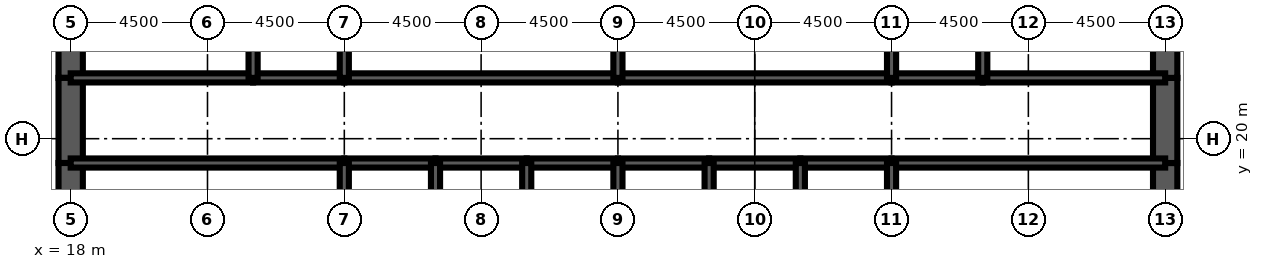
"""IFC4 building model, lengths in metres.
Left out: names, types, materials, properties, quantities, classifications, styles, units other than length and angle.
Written with IfcOpenShell. Run it as: python <this file> out.ifc"""

import sys

from ifc_helpers import new_model, si_unit, direction, frame, frame_2d, origin, place, context, subcontext, project, spatial, rectangle, extrude, element, fill, save


model = new_model("IFC4")
c1 = context("Model", 3, precision=1e-05, world=origin(), true_north=direction((0.0, 1.0)))
c2 = subcontext(c1, "Body", "Model", "MODEL_VIEW")
j1 = project(units=[si_unit("LENGTHUNIT", "METRE"), si_unit("PLANEANGLEUNIT", "RADIAN")], contexts=[c1])
p1 = place(None, origin())
s1 = spatial("IfcSite", under=j1, at=p1, CompositionType="ELEMENT")
p2 = place(p1, origin())
s2 = spatial("IfcBuilding", under=s1, at=p2, CompositionType="ELEMENT")
p3 = place(p2, frame((0.0, 0.0, 223.6)))
s3 = spatial("IfcBuildingStorey", under=s2, at=p3, CompositionType="ELEMENT", Elevation=223.6)
p4 = place(p3, frame((18.0, 26.0, 0.0), z_axis=(0.0, 0.0, 1.0), x_axis=(0.0, -1.0, 0.0)))
e1 = element("IfcWall", 1, at=p4, inside=s3, PredefinedType="SHEAR", context=c2, shape_type="SweptSolid", body=[
    extrude(rectangle(XDim=4.0, YDim=0.8, at=frame_2d((2.0, 0.0))), origin(), (0.0, 0.0, 1.0), 4.2),
])
p5 = place(p3, frame((18.0, 22.0, 0.0), z_axis=(0.0, 0.0, 1.0), x_axis=(0.0, -1.0, 0.0)))
e2 = element("IfcWall", 2, at=p5, inside=s3, PredefinedType="SHEAR", context=c2, shape_type="SweptSolid", body=[
    extrude(rectangle(XDim=2.8, YDim=0.8, at=frame_2d((1.4, 0.0))), origin(), (0.0, 0.0, 1.0), 4.2),
])
p6 = place(p5, frame((0.6, 0.0, 0.0)))
e3 = element("IfcOpeningElement", 3, at=p6, cuts=e2, PredefinedType="OPENING", context=c2, shape_type="SweptSolid", body=[
    extrude(rectangle(XDim=1.8, YDim=2.1, at=frame_2d((0.9, 1.05))), frame((0.0, 0.41, 0.0), z_axis=(0.0, -1.0, 0.0), x_axis=(1.0, 0.0, 0.0)), (0.0, 0.0, 1.0), 0.82),
])
for number, where, z_axis, x_axis in (
    (4, (18.0, 19.2, 0.0), (0.0, 0.0, 1.0), (0.0, -1.0, 0.0)),
    (5, (54.0, 16.0, 0.0), (0.0, 0.0, 1.0), (0.0, 1.0, 0.0)),
):
    element("IfcWall", number, at=place(p3, frame(where, z_axis=z_axis, x_axis=x_axis)), inside=s3, PredefinedType="SHEAR", context=c2, shape_type="SweptSolid", body=[
        extrude(rectangle(XDim=3.2, YDim=0.8, at=frame_2d((1.6, 0.0))), origin(), (0.0, 0.0, 1.0), 4.2),
    ])
p7 = place(p3, frame((54.0, 19.2, 0.0), z_axis=(0.0, 0.0, 1.0), x_axis=(0.0, 1.0, 0.0)))
e6 = element("IfcWall", 6, at=p7, inside=s3, PredefinedType="SHEAR", context=c2, shape_type="SweptSolid", body=[
    extrude(rectangle(XDim=2.8, YDim=0.8, at=frame_2d((1.4, 0.0))), origin(), (0.0, 0.0, 1.0), 4.2),
])
p8 = place(p7, frame((0.4, 0.0, 0.0)))
e7 = element("IfcOpeningElement", 7, at=p8, cuts=e6, PredefinedType="OPENING", context=c2, shape_type="SweptSolid", body=[
    extrude(rectangle(XDim=1.8, YDim=2.1, at=frame_2d((0.9, 1.05))), frame((0.0, 0.41, 0.0), z_axis=(0.0, -1.0, 0.0), x_axis=(1.0, 0.0, 0.0)), (0.0, 0.0, 1.0), 0.82),
])
p9 = place(p3, frame((54.0, 22.0, 0.0), z_axis=(0.0, 0.0, 1.0), x_axis=(0.0, 1.0, 0.0)))
e8 = element("IfcWall", 8, at=p9, inside=s3, PredefinedType="SHEAR", context=c2, shape_type="SweptSolid", body=[
    extrude(rectangle(XDim=4.0, YDim=0.8, at=frame_2d((2.0, 0.0))), origin(), (0.0, 0.0, 1.0), 4.2),
])
p10 = place(p3, frame((18.0, 19.2, 0.0), z_axis=(0.0, 0.0, 1.0), x_axis=(1.0, 0.0, 0.0)))
e9 = element("IfcWall", 9, at=p10, inside=s3, PredefinedType="SOLIDWALL", context=c2, shape_type="SweptSolid", body=[
    extrude(rectangle(XDim=9.0, YDim=0.3, at=frame_2d((4.5, 0.0))), origin(), (0.0, 0.0, 1.0), 4.2),
])
p11 = place(p10, frame((0.65, 0.0, 0.0)))
e10 = element("IfcOpeningElement", 10, at=p11, cuts=e9, PredefinedType="OPENING", context=c2, shape_type="SweptSolid", body=[
    extrude(rectangle(XDim=1.0, YDim=2.1, at=frame_2d((0.5, 1.05))), frame((0.0, 0.16, 0.0), z_axis=(0.0, -1.0, 0.0), x_axis=(1.0, 0.0, 0.0)), (0.0, 0.0, 1.0), 0.32),
])
p12 = place(p3, frame((27.0, 19.2, 0.0), z_axis=(0.0, 0.0, 1.0), x_axis=(1.0, 0.0, 0.0)))
e11 = element("IfcWall", 11, at=p12, inside=s3, PredefinedType="SOLIDWALL", context=c2, shape_type="SweptSolid", body=[
    extrude(rectangle(XDim=3.0, YDim=0.3, at=frame_2d((1.5, 0.0))), origin(), (0.0, 0.0, 1.0), 4.2),
])
p13 = place(p12, frame((0.95, 0.0, 0.0)))
e12 = element("IfcOpeningElement", 12, at=p13, cuts=e11, PredefinedType="OPENING", context=c2, shape_type="SweptSolid", body=[
    extrude(rectangle(XDim=1.1, YDim=2.2, at=frame_2d((0.55, 1.1))), frame((0.0, 0.16, 0.0), z_axis=(0.0, -1.0, 0.0), x_axis=(1.0, 0.0, 0.0)), (0.0, 0.0, 1.0), 0.32),
])
p14 = place(p3, frame((30.0, 19.2, 0.0), z_axis=(0.0, 0.0, 1.0), x_axis=(1.0, 0.0, 0.0)))
e13 = element("IfcWall", 13, at=p14, inside=s3, PredefinedType="SOLIDWALL", context=c2, shape_type="SweptSolid", body=[
    extrude(rectangle(XDim=3.0, YDim=0.3, at=frame_2d((1.5, 0.0))), origin(), (0.0, 0.0, 1.0), 4.2),
])
p15 = place(p14, frame((0.95, 0.0, 0.0)))
e14 = element("IfcOpeningElement", 14, at=p15, cuts=e13, PredefinedType="OPENING", context=c2, shape_type="SweptSolid", body=[
    extrude(rectangle(XDim=1.1, YDim=2.2, at=frame_2d((0.55, 1.1))), frame((0.0, 0.16, 0.0), z_axis=(0.0, -1.0, 0.0), x_axis=(1.0, 0.0, 0.0)), (0.0, 0.0, 1.0), 0.32),
])
p16 = place(p3, frame((33.0, 19.2, 0.0), z_axis=(0.0, 0.0, 1.0), x_axis=(1.0, 0.0, 0.0)))
e15 = element("IfcWall", 15, at=p16, inside=s3, PredefinedType="SOLIDWALL", context=c2, shape_type="SweptSolid", body=[
    extrude(rectangle(XDim=3.0, YDim=0.3, at=frame_2d((1.5, 0.0))), origin(), (0.0, 0.0, 1.0), 4.2),
])
p17 = place(p16, frame((0.95, 0.0, 0.0)))
e16 = element("IfcOpeningElement", 16, at=p17, cuts=e15, PredefinedType="OPENING", context=c2, shape_type="SweptSolid", body=[
    extrude(rectangle(XDim=1.1, YDim=2.2, at=frame_2d((0.55, 1.1))), frame((0.0, 0.16, 0.0), z_axis=(0.0, -1.0, 0.0), x_axis=(1.0, 0.0, 0.0)), (0.0, 0.0, 1.0), 0.32),
])
p18 = place(p3, frame((36.0, 19.2, 0.0), z_axis=(0.0, 0.0, 1.0), x_axis=(1.0, 0.0, 0.0)))
e17 = element("IfcWall", 17, at=p18, inside=s3, PredefinedType="SOLIDWALL", context=c2, shape_type="SweptSolid", body=[
    extrude(rectangle(XDim=3.0, YDim=0.3, at=frame_2d((1.5, 0.0))), origin(), (0.0, 0.0, 1.0), 4.2),
])
p19 = place(p18, frame((0.95, 0.0, 0.0)))
e18 = element("IfcOpeningElement", 18, at=p19, cuts=e17, PredefinedType="OPENING", context=c2, shape_type="SweptSolid", body=[
    extrude(rectangle(XDim=1.1, YDim=2.2, at=frame_2d((0.55, 1.1))), frame((0.0, 0.16, 0.0), z_axis=(0.0, -1.0, 0.0), x_axis=(1.0, 0.0, 0.0)), (0.0, 0.0, 1.0), 0.32),
])
p20 = place(p3, frame((39.0, 19.2, 0.0), z_axis=(0.0, 0.0, 1.0), x_axis=(1.0, 0.0, 0.0)))
e19 = element("IfcWall", 19, at=p20, inside=s3, PredefinedType="SOLIDWALL", context=c2, shape_type="SweptSolid", body=[
    extrude(rectangle(XDim=3.0, YDim=0.3, at=frame_2d((1.5, 0.0))), origin(), (0.0, 0.0, 1.0), 4.2),
])
p21 = place(p20, frame((1.0, 0.0, 0.0)))
e20 = element("IfcOpeningElement", 20, at=p21, cuts=e19, PredefinedType="OPENING", context=c2, shape_type="SweptSolid", body=[
    extrude(rectangle(XDim=1.0, YDim=2.1, at=frame_2d((0.5, 1.05))), frame((0.0, 0.16, 0.0), z_axis=(0.0, -1.0, 0.0), x_axis=(1.0, 0.0, 0.0)), (0.0, 0.0, 1.0), 0.32),
])
p22 = place(p3, frame((42.0, 19.2, 0.0), z_axis=(0.0, 0.0, 1.0), x_axis=(1.0, 0.0, 0.0)))
e21 = element("IfcWall", 21, at=p22, inside=s3, PredefinedType="SOLIDWALL", context=c2, shape_type="SweptSolid", body=[
    extrude(rectangle(XDim=3.0, YDim=0.3, at=frame_2d((1.5, 0.0))), origin(), (0.0, 0.0, 1.0), 4.2),
])
p23 = place(p22, frame((1.0, 0.0, 0.0)))
e22 = element("IfcOpeningElement", 22, at=p23, cuts=e21, PredefinedType="OPENING", context=c2, shape_type="SweptSolid", body=[
    extrude(rectangle(XDim=1.0, YDim=2.1, at=frame_2d((0.5, 1.05))), frame((0.0, 0.16, 0.0), z_axis=(0.0, -1.0, 0.0), x_axis=(1.0, 0.0, 0.0)), (0.0, 0.0, 1.0), 0.32),
])
p24 = place(p3, frame((45.0, 19.2, 0.0), z_axis=(0.0, 0.0, 1.0), x_axis=(1.0, 0.0, 0.0)))
e23 = element("IfcWall", 23, at=p24, inside=s3, PredefinedType="SOLIDWALL", context=c2, shape_type="SweptSolid", body=[
    extrude(rectangle(XDim=9.0, YDim=0.3, at=frame_2d((4.5, 0.0))), origin(), (0.0, 0.0, 1.0), 4.2),
])
p25 = place(p24, frame((7.35, 0.0, 0.0)))
e24 = element("IfcOpeningElement", 24, at=p25, cuts=e23, PredefinedType="OPENING", context=c2, shape_type="SweptSolid", body=[
    extrude(rectangle(XDim=1.0, YDim=2.1, at=frame_2d((0.5, 1.05))), frame((0.0, 0.16, 0.0), z_axis=(0.0, -1.0, 0.0), x_axis=(1.0, 0.0, 0.0)), (0.0, 0.0, 1.0), 0.32),
])
p26 = place(p3, frame((18.0, 22.0, 0.0), z_axis=(0.0, 0.0, 1.0), x_axis=(1.0, 0.0, 0.0)))
e25 = element("IfcWall", 25, at=p26, inside=s3, PredefinedType="SOLIDWALL", context=c2, shape_type="SweptSolid", body=[
    extrude(rectangle(XDim=6.0, YDim=0.3, at=frame_2d((3.0, 0.0))), origin(), (0.0, 0.0, 1.0), 4.2),
])
p27 = place(p26, frame((2.0, 0.0, 0.0)))
e26 = element("IfcOpeningElement", 26, at=p27, cuts=e25, PredefinedType="OPENING", context=c2, shape_type="SweptSolid", body=[
    extrude(rectangle(XDim=1.0, YDim=2.1, at=frame_2d((0.5, 1.05))), frame((0.0, 0.16, 0.0), z_axis=(0.0, -1.0, 0.0), x_axis=(1.0, 0.0, 0.0)), (0.0, 0.0, 1.0), 0.32),
])
p28 = place(p3, frame((24.0, 22.0, 0.0), z_axis=(0.0, 0.0, 1.0), x_axis=(1.0, 0.0, 0.0)))
e27 = element("IfcWall", 27, at=p28, inside=s3, PredefinedType="SOLIDWALL", context=c2, shape_type="SweptSolid", body=[
    extrude(rectangle(XDim=3.0, YDim=0.3, at=frame_2d((1.5, 0.0))), origin(), (0.0, 0.0, 1.0), 4.2),
])
p29 = place(p28, frame((1.0, 0.0, 0.0)))
e28 = element("IfcOpeningElement", 28, at=p29, cuts=e27, PredefinedType="OPENING", context=c2, shape_type="SweptSolid", body=[
    extrude(rectangle(XDim=1.0, YDim=2.1, at=frame_2d((0.5, 1.05))), frame((0.0, 0.16, 0.0), z_axis=(0.0, -1.0, 0.0), x_axis=(1.0, 0.0, 0.0)), (0.0, 0.0, 1.0), 0.32),
])
p30 = place(p3, frame((27.0, 22.0, 0.0), z_axis=(0.0, 0.0, 1.0), x_axis=(1.0, 0.0, 0.0)))
e29 = element("IfcWall", 29, at=p30, inside=s3, PredefinedType="SOLIDWALL", context=c2, shape_type="SweptSolid", body=[
    extrude(rectangle(XDim=9.0, YDim=0.3, at=frame_2d((4.5, 0.0))), origin(), (0.0, 0.0, 1.0), 4.2),
])
p31 = place(p30, frame((4.0, 0.0, 0.0)))
e30 = element("IfcOpeningElement", 30, at=p31, cuts=e29, PredefinedType="OPENING", context=c2, shape_type="SweptSolid", body=[
    extrude(rectangle(XDim=1.0, YDim=2.1, at=frame_2d((0.5, 1.05))), frame((0.0, 0.16, 0.0), z_axis=(0.0, -1.0, 0.0), x_axis=(1.0, 0.0, 0.0)), (0.0, 0.0, 1.0), 0.32),
])
p32 = place(p3, frame((36.0, 22.0, 0.0), z_axis=(0.0, 0.0, 1.0), x_axis=(1.0, 0.0, 0.0)))
e31 = element("IfcWall", 31, at=p32, inside=s3, PredefinedType="SOLIDWALL", context=c2, shape_type="SweptSolid", body=[
    extrude(rectangle(XDim=9.0, YDim=0.3, at=frame_2d((4.5, 0.0))), origin(), (0.0, 0.0, 1.0), 4.2),
])
p33 = place(p32, frame((4.0, 0.0, 0.0)))
e32 = element("IfcOpeningElement", 32, at=p33, cuts=e31, PredefinedType="OPENING", context=c2, shape_type="SweptSolid", body=[
    extrude(rectangle(XDim=1.0, YDim=2.1, at=frame_2d((0.5, 1.05))), frame((0.0, 0.16, 0.0), z_axis=(0.0, -1.0, 0.0), x_axis=(1.0, 0.0, 0.0)), (0.0, 0.0, 1.0), 0.32),
])
p34 = place(p3, frame((45.0, 22.0, 0.0), z_axis=(0.0, 0.0, 1.0), x_axis=(1.0, 0.0, 0.0)))
e33 = element("IfcWall", 33, at=p34, inside=s3, PredefinedType="SOLIDWALL", context=c2, shape_type="SweptSolid", body=[
    extrude(rectangle(XDim=3.0, YDim=0.3, at=frame_2d((1.5, 0.0))), origin(), (0.0, 0.0, 1.0), 4.2),
])
p35 = place(p34, frame((1.0, 0.0, 0.0)))
e34 = element("IfcOpeningElement", 34, at=p35, cuts=e33, PredefinedType="OPENING", context=c2, shape_type="SweptSolid", body=[
    extrude(rectangle(XDim=1.0, YDim=2.1, at=frame_2d((0.5, 1.05))), frame((0.0, 0.16, 0.0), z_axis=(0.0, -1.0, 0.0), x_axis=(1.0, 0.0, 0.0)), (0.0, 0.0, 1.0), 0.32),
])
p36 = place(p3, frame((48.0, 22.0, 0.0), z_axis=(0.0, 0.0, 1.0), x_axis=(1.0, 0.0, 0.0)))
e35 = element("IfcWall", 35, at=p36, inside=s3, PredefinedType="SOLIDWALL", context=c2, shape_type="SweptSolid", body=[
    extrude(rectangle(XDim=6.0, YDim=0.3, at=frame_2d((3.0, 0.0))), origin(), (0.0, 0.0, 1.0), 4.2),
])
p37 = place(p36, frame((2.0, 0.0, 0.0)))
e36 = element("IfcOpeningElement", 36, at=p37, cuts=e35, PredefinedType="OPENING", context=c2, shape_type="SweptSolid", body=[
    extrude(rectangle(XDim=1.0, YDim=2.1, at=frame_2d((0.5, 1.05))), frame((0.0, 0.16, 0.0), z_axis=(0.0, -1.0, 0.0), x_axis=(1.0, 0.0, 0.0)), (0.0, 0.0, 1.0), 0.32),
])
p38 = place(p36, frame((4.35, 0.0, 0.0)))
e37 = element("IfcOpeningElement", 37, at=p38, cuts=e35, PredefinedType="OPENING", context=c2, shape_type="SweptSolid", body=[
    extrude(rectangle(XDim=1.0, YDim=2.1, at=frame_2d((0.5, 1.05))), frame((0.0, 0.16, 0.0), z_axis=(0.0, -1.0, 0.0), x_axis=(1.0, 0.0, 0.0)), (0.0, 0.0, 1.0), 0.32),
])
for number, where, z_axis, x_axis in (
    (38, (27.0, 16.0, 0.0), (0.0, 0.0, 1.0), (0.0, 1.0, 0.0)),
    (39, (30.0, 16.0, 0.0), (0.0, 0.0, 1.0), (0.0, 1.0, 0.0)),
    (40, (33.0, 16.0, 0.0), (0.0, 0.0, 1.0), (0.0, 1.0, 0.0)),
    (41, (36.0, 16.0, 0.0), (0.0, 0.0, 1.0), (0.0, 1.0, 0.0)),
    (42, (39.0, 16.0, 0.0), (0.0, 0.0, 1.0), (0.0, 1.0, 0.0)),
    (43, (42.0, 16.0, 0.0), (0.0, 0.0, 1.0), (0.0, 1.0, 0.0)),
    (44, (45.0, 16.0, 0.0), (0.0, 0.0, 1.0), (0.0, 1.0, 0.0)),
):
    element("IfcWall", number, at=place(p3, frame(where, z_axis=z_axis, x_axis=x_axis)), inside=s3, PredefinedType="SOLIDWALL", context=c2, shape_type="SweptSolid", body=[
        extrude(rectangle(XDim=3.2, YDim=0.3, at=frame_2d((1.6, 0.0))), origin(), (0.0, 0.0, 1.0), 4.2),
    ])
for number, where, z_axis, x_axis in (
    (45, (24.0, 22.0, 0.0), (0.0, 0.0, 1.0), (0.0, 1.0, 0.0)),
    (46, (27.0, 22.0, 0.0), (0.0, 0.0, 1.0), (0.0, 1.0, 0.0)),
    (47, (36.0, 22.0, 0.0), (0.0, 0.0, 1.0), (0.0, 1.0, 0.0)),
    (48, (45.0, 22.0, 0.0), (0.0, 0.0, 1.0), (0.0, 1.0, 0.0)),
    (49, (48.0, 22.0, 0.0), (0.0, 0.0, 1.0), (0.0, 1.0, 0.0)),
):
    element("IfcWall", number, at=place(p3, frame(where, z_axis=z_axis, x_axis=x_axis)), inside=s3, PredefinedType="SOLIDWALL", context=c2, shape_type="SweptSolid", body=[
        extrude(rectangle(XDim=4.0, YDim=0.3, at=frame_2d((2.0, 0.0))), origin(), (0.0, 0.0, 1.0), 4.2),
    ])
p39 = place(p3, frame((42.0, 22.15, 0.0), z_axis=(0.0, 0.0, 1.0), x_axis=(0.0, 1.0, 0.0)))
e50 = element("IfcWall", 50, at=p39, inside=s3, PredefinedType="PARTITIONING", context=c2, shape_type="SweptSolid", body=[
    extrude(rectangle(XDim=3.7, YDim=0.15, at=frame_2d((1.85, 0.0))), origin(), (0.0, 0.0, 1.0), 3.0),
])
p40 = place(p39, frame((2.2, 0.0, 0.0)))
e51 = element("IfcOpeningElement", 51, at=p40, cuts=e50, PredefinedType="OPENING", context=c2, shape_type="SweptSolid", body=[
    extrude(rectangle(XDim=1.0, YDim=2.1, at=frame_2d((0.5, 1.05))), frame((0.0, 0.085, 0.0), z_axis=(0.0, -1.0, 0.0), x_axis=(1.0, 0.0, 0.0)), (0.0, 0.0, 1.0), 0.17),
])
p41 = place(p3, frame((52.025, 22.15, 0.0), z_axis=(0.0, 0.0, 1.0), x_axis=(0.0, 1.0, 0.0)))
e52 = element("IfcWall", 52, at=p41, inside=s3, PredefinedType="PARTITIONING", context=c2, shape_type="SweptSolid", body=[
    extrude(rectangle(XDim=3.7, YDim=0.15, at=frame_2d((1.85, 0.0))), origin(), (0.0, 0.0, 1.0), 3.0),
])
p42 = place(p13, origin())
e53 = element("IfcDoor", 53, at=p42, inside=s3, OperationType="DOUBLE_DOOR_SLIDING", PredefinedType="USERDEFINED", context=c2, shape_type="SweptSolid", body=[
    extrude(rectangle(XDim=1.1, YDim=2.2, at=frame_2d((0.55, 1.1))), frame((0.0, 0.025, 0.0), z_axis=(0.0, -1.0, 0.0), x_axis=(1.0, 0.0, 0.0)), (0.0, 0.0, 1.0), 0.05),
])
fill(e12, e53)
p43 = place(p15, origin())
e54 = element("IfcDoor", 54, at=p43, inside=s3, OperationType="DOUBLE_DOOR_SLIDING", PredefinedType="USERDEFINED", context=c2, shape_type="SweptSolid", body=[
    extrude(rectangle(XDim=1.1, YDim=2.2, at=frame_2d((0.55, 1.1))), frame((0.0, 0.025, 0.0), z_axis=(0.0, -1.0, 0.0), x_axis=(1.0, 0.0, 0.0)), (0.0, 0.0, 1.0), 0.05),
])
fill(e14, e54)
p44 = place(p17, origin())
e55 = element("IfcDoor", 55, at=p44, inside=s3, OperationType="DOUBLE_DOOR_SLIDING", PredefinedType="USERDEFINED", context=c2, shape_type="SweptSolid", body=[
    extrude(rectangle(XDim=1.1, YDim=2.2, at=frame_2d((0.55, 1.1))), frame((0.0, 0.025, 0.0), z_axis=(0.0, -1.0, 0.0), x_axis=(1.0, 0.0, 0.0)), (0.0, 0.0, 1.0), 0.05),
])
fill(e16, e55)
p45 = place(p19, origin())
e56 = element("IfcDoor", 56, at=p45, inside=s3, OperationType="DOUBLE_DOOR_SLIDING", PredefinedType="USERDEFINED", context=c2, shape_type="SweptSolid", body=[
    extrude(rectangle(XDim=1.1, YDim=2.2, at=frame_2d((0.55, 1.1))), frame((0.0, 0.025, 0.0), z_axis=(0.0, -1.0, 0.0), x_axis=(1.0, 0.0, 0.0)), (0.0, 0.0, 1.0), 0.05),
])
fill(e18, e56)
p46 = place(p11, origin())
e57 = element("IfcDoor", 57, at=p46, inside=s3, OperationType="SINGLE_SWING_LEFT", PredefinedType="DOOR", context=c2, shape_type="SweptSolid", body=[
    extrude(rectangle(XDim=1.0, YDim=2.1, at=frame_2d((0.5, 1.05))), frame((0.0, 0.025, 0.0), z_axis=(0.0, -1.0, 0.0), x_axis=(1.0, 0.0, 0.0)), (0.0, 0.0, 1.0), 0.05),
])
fill(e10, e57)
p47 = place(p25, origin())
e58 = element("IfcDoor", 58, at=p47, inside=s3, OperationType="SINGLE_SWING_RIGHT", PredefinedType="DOOR", context=c2, shape_type="SweptSolid", body=[
    extrude(rectangle(XDim=1.0, YDim=2.1, at=frame_2d((0.5, 1.05))), frame((0.0, 0.025, 0.0), z_axis=(0.0, -1.0, 0.0), x_axis=(1.0, 0.0, 0.0)), (0.0, 0.0, 1.0), 0.05),
])
fill(e24, e58)
p48 = place(p6, origin())
e59 = element("IfcDoor", 59, at=p48, inside=s3, OperationType="SINGLE_SWING_LEFT", PredefinedType="DOOR", context=c2, shape_type="SweptSolid", body=[
    extrude(rectangle(XDim=1.8, YDim=2.1, at=frame_2d((0.9, 1.05))), frame((0.0, 0.4, 0.0), z_axis=(0.0, -1.0, 0.0), x_axis=(1.0, 0.0, 0.0)), (0.0, 0.0, 1.0), 0.8),
])
fill(e3, e59)
p49 = place(p8, origin())
e60 = element("IfcDoor", 60, at=p49, inside=s3, OperationType="SINGLE_SWING_LEFT", PredefinedType="DOOR", context=c2, shape_type="SweptSolid", body=[
    extrude(rectangle(XDim=1.8, YDim=2.1, at=frame_2d((0.9, 1.05))), frame((0.0, 0.4, 0.0), z_axis=(0.0, -1.0, 0.0), x_axis=(1.0, 0.0, 0.0)), (0.0, 0.0, 1.0), 0.8),
])
fill(e7, e60)
p50 = place(p27, origin())
e61 = element("IfcDoor", 61, at=p50, inside=s3, OperationType="SINGLE_SWING_LEFT", PredefinedType="DOOR", context=c2, shape_type="SweptSolid", body=[
    extrude(rectangle(XDim=1.0, YDim=2.1, at=frame_2d((0.5, 1.05))), frame((0.0, 0.025, 0.0), z_axis=(0.0, -1.0, 0.0), x_axis=(1.0, 0.0, 0.0)), (0.0, 0.0, 1.0), 0.05),
])
fill(e26, e61)
p51 = place(p29, origin())
e62 = element("IfcDoor", 62, at=p51, inside=s3, OperationType="SINGLE_SWING_LEFT", PredefinedType="DOOR", context=c2, shape_type="SweptSolid", body=[
    extrude(rectangle(XDim=1.0, YDim=2.1, at=frame_2d((0.5, 1.05))), frame((0.0, 0.025, 0.0), z_axis=(0.0, -1.0, 0.0), x_axis=(1.0, 0.0, 0.0)), (0.0, 0.0, 1.0), 0.05),
])
fill(e28, e62)
p52 = place(p31, origin())
e63 = element("IfcDoor", 63, at=p52, inside=s3, OperationType="SINGLE_SWING_LEFT", PredefinedType="DOOR", context=c2, shape_type="SweptSolid", body=[
    extrude(rectangle(XDim=1.0, YDim=2.1, at=frame_2d((0.5, 1.05))), frame((0.0, 0.025, 0.0), z_axis=(0.0, -1.0, 0.0), x_axis=(1.0, 0.0, 0.0)), (0.0, 0.0, 1.0), 0.05),
])
fill(e30, e63)
p53 = place(p33, origin())
e64 = element("IfcDoor", 64, at=p53, inside=s3, OperationType="SINGLE_SWING_LEFT", PredefinedType="DOOR", context=c2, shape_type="SweptSolid", body=[
    extrude(rectangle(XDim=1.0, YDim=2.1, at=frame_2d((0.5, 1.05))), frame((0.0, 0.025, 0.0), z_axis=(0.0, -1.0, 0.0), x_axis=(1.0, 0.0, 0.0)), (0.0, 0.0, 1.0), 0.05),
])
fill(e32, e64)
p54 = place(p35, origin())
e65 = element("IfcDoor", 65, at=p54, inside=s3, OperationType="SINGLE_SWING_LEFT", PredefinedType="DOOR", context=c2, shape_type="SweptSolid", body=[
    extrude(rectangle(XDim=1.0, YDim=2.1, at=frame_2d((0.5, 1.05))), frame((0.0, 0.025, 0.0), z_axis=(0.0, -1.0, 0.0), x_axis=(1.0, 0.0, 0.0)), (0.0, 0.0, 1.0), 0.05),
])
fill(e34, e65)
p55 = place(p37, origin())
e66 = element("IfcDoor", 66, at=p55, inside=s3, OperationType="SINGLE_SWING_LEFT", PredefinedType="DOOR", context=c2, shape_type="SweptSolid", body=[
    extrude(rectangle(XDim=1.0, YDim=2.1, at=frame_2d((0.5, 1.05))), frame((0.0, 0.025, 0.0), z_axis=(0.0, -1.0, 0.0), x_axis=(1.0, 0.0, 0.0)), (0.0, 0.0, 1.0), 0.05),
])
fill(e36, e66)
p56 = place(p38, origin())
e67 = element("IfcDoor", 67, at=p56, inside=s3, OperationType="SINGLE_SWING_RIGHT", PredefinedType="DOOR", context=c2, shape_type="SweptSolid", body=[
    extrude(rectangle(XDim=1.0, YDim=2.1, at=frame_2d((0.5, 1.05))), frame((0.0, 0.025, 0.0), z_axis=(0.0, -1.0, 0.0), x_axis=(1.0, 0.0, 0.0)), (0.0, 0.0, 1.0), 0.05),
])
fill(e37, e67)
p57 = place(p21, origin())
e68 = element("IfcDoor", 68, at=p57, inside=s3, OperationType="SINGLE_SWING_LEFT", PredefinedType="DOOR", context=c2, shape_type="SweptSolid", body=[
    extrude(rectangle(XDim=1.0, YDim=2.1, at=frame_2d((0.5, 1.05))), frame((0.0, 0.025, 0.0), z_axis=(0.0, -1.0, 0.0), x_axis=(1.0, 0.0, 0.0)), (0.0, 0.0, 1.0), 0.05),
])
fill(e20, e68)
p58 = place(p23, origin())
e69 = element("IfcDoor", 69, at=p58, inside=s3, OperationType="SINGLE_SWING_LEFT", PredefinedType="DOOR", context=c2, shape_type="SweptSolid", body=[
    extrude(rectangle(XDim=1.0, YDim=2.1, at=frame_2d((0.5, 1.05))), frame((0.0, 0.025, 0.0), z_axis=(0.0, -1.0, 0.0), x_axis=(1.0, 0.0, 0.0)), (0.0, 0.0, 1.0), 0.05),
])
fill(e22, e69)
save(model, sys.argv[1])
